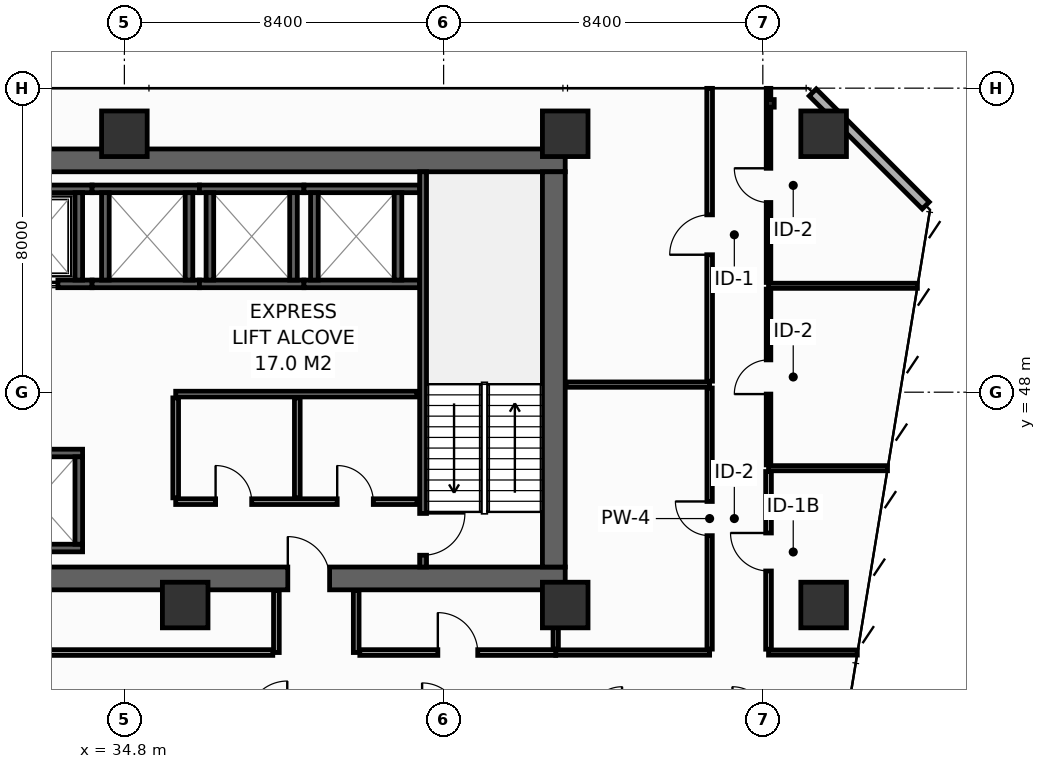
"""IFC4 building model, lengths in metres.
Left out: names, types, materials, properties, quantities, classifications, styles, units other than length and angle.
Written with IfcOpenShell. Run it as: python <this file> out.ifc"""

import sys

from ifc_helpers import new_model, si_unit, direction, frame, frame_2d, origin, origin_2d, place, context, subcontext, project, spatial, rectangle, hollow_rectangle, extrude, element, fill, save


model = new_model("IFC4")
c1 = context("Model", 3, precision=1e-05, world=origin(), true_north=direction((0.0, 1.0)))
c2 = subcontext(c1, "Body", "Model", "MODEL_VIEW")
j1 = project(units=[si_unit("LENGTHUNIT", "METRE"), si_unit("PLANEANGLEUNIT", "RADIAN")], contexts=[c1])
p1 = place(None, origin())
s1 = spatial("IfcSite", under=j1, at=p1, CompositionType="ELEMENT")
p2 = place(p1, origin())
s2 = spatial("IfcBuilding", under=s1, at=p2, CompositionType="ELEMENT")
p3 = place(p2, frame((0.0, 0.0, 64.8)))
s3 = spatial("IfcBuildingStorey", under=s2, at=p3, CompositionType="ELEMENT", Elevation=64.8)
p4 = place(p3, frame((13.5, 43.1, 0.0), z_axis=(0.0, 0.0, 1.0), x_axis=(1.0, 0.0, 0.0)))
e1 = element("IfcWall", 1, at=p4, inside=s3, PredefinedType="SHEAR", context=c2, shape_type="SweptSolid", body=[
    extrude(rectangle(XDim=32.9, YDim=0.6, at=frame_2d((16.45, 0.0))), origin(), (0.0, 0.0, 1.0), 4.15),
])
p5 = place(p4, frame((5.4, 0.0, 0.0)))
e2 = element("IfcOpeningElement", 2, at=p5, cuts=e1, PredefinedType="OPENING", context=c2, shape_type="SweptSolid", body=[
    extrude(rectangle(XDim=1.1, YDim=2.15, at=frame_2d((0.55, 1.075))), frame((0.0, 0.31, 0.0), z_axis=(0.0, -1.0, 0.0), x_axis=(1.0, 0.0, 0.0)), (0.0, 0.0, 1.0), 0.62),
])
p6 = place(p4, frame((25.6, 0.0, 0.0)))
e3 = element("IfcOpeningElement", 3, at=p6, cuts=e1, PredefinedType="OPENING", context=c2, shape_type="SweptSolid", body=[
    extrude(rectangle(XDim=1.1, YDim=2.15, at=frame_2d((0.55, 1.075))), frame((0.0, 0.31, 0.0), z_axis=(0.0, -1.0, 0.0), x_axis=(1.0, 0.0, 0.0)), (0.0, 0.0, 1.0), 0.62),
])
p7 = place(p3, frame((13.5, 54.1, 0.0), z_axis=(0.0, 0.0, 1.0), x_axis=(1.0, 0.0, 0.0)))
e4 = element("IfcWall", 4, at=p7, inside=s3, PredefinedType="SHEAR", context=c2, shape_type="SweptSolid", body=[
    extrude(rectangle(XDim=32.9, YDim=0.6, at=frame_2d((16.45, 0.0))), origin(), (0.0, 0.0, 1.0), 4.15),
])
p8 = place(p3, frame((46.1, 43.4, 0.0), z_axis=(0.0, 0.0, 1.0), x_axis=(0.0, 1.0, 0.0)))
e5 = element("IfcWall", 5, at=p8, inside=s3, PredefinedType="SHEAR", context=c2, shape_type="SweptSolid", body=[
    extrude(rectangle(XDim=10.4, YDim=0.6, at=frame_2d((5.2, 0.0))), origin(), (0.0, 0.0, 1.0), 4.15),
])
for number, where, z_axis, x_axis in (
    (6, (34.8, 54.8, 0.0), (0.0, 0.0, 1.0), (1.0, 0.0, 0.0)),
    (7, (46.4, 54.8, 0.0), (0.0, 0.0, 1.0), (1.0, 0.0, 0.0)),
    (8, (53.2, 54.8, 0.0), (0.0, 0.0, 1.0), (1.0, 0.0, 0.0)),
    (9, (36.4, 42.4, 0.0), (0.0, 0.0, 1.0), (1.0, 0.0, 0.0)),
    (10, (46.4, 42.4, 0.0), (0.0, 0.0, 1.0), (1.0, 0.0, 0.0)),
    (11, (53.2, 42.4, 0.0), (0.0, 0.0, 1.0), (1.0, 0.0, 0.0)),
):
    element("IfcColumn", number, at=place(p3, frame(where, z_axis=z_axis, x_axis=x_axis)), inside=s3, PredefinedType="COLUMN", context=c2, shape_type="SweptSolid", body=[
        extrude(hollow_rectangle(XDim=1.2, YDim=1.2, WallThickness=0.055, at=origin_2d()), origin(), (0.0, 0.0, 1.0), 4.4),
    ])
p9 = place(p3, frame((51.8, 55.6, 0.0), z_axis=(0.0, 0.0, 1.0), x_axis=(1.0, 0.0, 0.0)))
e12 = element("IfcColumn", 12, at=p9, inside=s3, PredefinedType="PILASTER", context=c2, shape_type="SweptSolid", body=[
    extrude(hollow_rectangle(XDim=0.2, YDim=0.2, WallThickness=0.01, at=origin_2d()), origin(), (0.0, 0.0, 1.0), 4.4),
])
p10 = place(p3, frame((31.125, 50.85, 0.0), z_axis=(0.0, 0.0, 1.0), x_axis=(1.0, 0.0, 0.0)))
e13 = element("IfcWall", 13, at=p10, inside=s3, PredefinedType="SHEAR", context=c2, shape_type="SweptSolid", body=[
    extrude(rectangle(XDim=2.825, YDim=0.2, at=frame_2d((1.413, 0.0))), origin(), (0.0, 0.0, 1.0), 4.15),
])
p11 = place(p10, frame((0.825, 0.0, 0.0)))
e14 = element("IfcOpeningElement", 14, at=p11, cuts=e13, PredefinedType="OPENING", context=c2, shape_type="SweptSolid", body=[
    extrude(rectangle(XDim=1.1, YDim=2.2, at=frame_2d((0.55, 1.1))), frame((0.0, 0.11, 0.0), z_axis=(0.0, -1.0, 0.0), x_axis=(1.0, 0.0, 0.0)), (0.0, 0.0, 1.0), 0.22),
])
p12 = place(p3, frame((31.125, 53.35, 0.0), z_axis=(0.0, 0.0, 1.0), x_axis=(1.0, 0.0, 0.0)))
e15 = element("IfcWall", 15, at=p12, inside=s3, PredefinedType="SHEAR", context=c2, shape_type="SweptSolid", body=[
    extrude(rectangle(XDim=2.825, YDim=0.2, at=frame_2d((1.413, 0.0))), origin(), (0.0, 0.0, 1.0), 4.15),
])
p13 = place(p3, frame((33.6, 50.95, 0.0), z_axis=(0.0, 0.0, 1.0), x_axis=(0.0, 1.0, 0.0)))
e16 = element("IfcWall", 16, at=p13, inside=s3, PredefinedType="SHEAR", context=c2, shape_type="SweptSolid", body=[
    extrude(rectangle(XDim=2.3, YDim=0.2, at=frame_2d((1.15, 0.0))), origin(), (0.0, 0.0, 1.0), 4.15),
])
for number, where, z_axis, x_axis in (
    (17, (31.125, 43.9, 0.0), (0.0, 0.0, 1.0), (1.0, 0.0, 0.0)),
    (18, (31.125, 46.4, 0.0), (0.0, 0.0, 1.0), (1.0, 0.0, 0.0)),
):
    element("IfcWall", number, at=place(p3, frame(where, z_axis=z_axis, x_axis=x_axis)), inside=s3, PredefinedType="SHEAR", context=c2, shape_type="SweptSolid", body=[
        extrude(rectangle(XDim=2.575, YDim=0.2, at=frame_2d((1.288, 0.0))), origin(), (0.0, 0.0, 1.0), 4.15),
    ])
p14 = place(p3, frame((33.6, 44.0, 0.0), z_axis=(0.0, 0.0, 1.0), x_axis=(0.0, 1.0, 0.0)))
e19 = element("IfcWall", 19, at=p14, inside=s3, PredefinedType="SHEAR", context=c2, shape_type="SweptSolid", body=[
    extrude(rectangle(XDim=2.3, YDim=0.2, at=frame_2d((1.15, 0.0))), origin(), (0.0, 0.0, 1.0), 4.15),
])
for number, where, z_axis, x_axis in (
    (20, (33.95, 50.85, 0.0), (0.0, 0.0, 1.0), (1.0, 0.0, 0.0)),
    (21, (33.95, 53.35, 0.0), (0.0, 0.0, 1.0), (1.0, 0.0, 0.0)),
):
    element("IfcWall", number, at=place(p3, frame(where, z_axis=z_axis, x_axis=x_axis)), inside=s3, PredefinedType="SHEAR", context=c2, shape_type="SweptSolid", body=[
        extrude(rectangle(XDim=2.825, YDim=0.2, at=frame_2d((1.413, 0.0))), origin(), (0.0, 0.0, 1.0), 4.15),
    ])
for number, where, z_axis, x_axis in (
    (22, (34.3, 50.95, 0.0), (0.0, 0.0, 1.0), (0.0, 1.0, 0.0)),
    (23, (36.5, 50.95, 0.0), (0.0, 0.0, 1.0), (0.0, 1.0, 0.0)),
):
    element("IfcWall", number, at=place(p3, frame(where, z_axis=z_axis, x_axis=x_axis)), inside=s3, PredefinedType="SHEAR", context=c2, shape_type="SweptSolid", body=[
        extrude(rectangle(XDim=2.3, YDim=0.2, at=frame_2d((1.15, 0.0))), origin(), (0.0, 0.0, 1.0), 4.15),
    ])
for number, where, z_axis, x_axis in (
    (24, (36.775, 50.85, 0.0), (0.0, 0.0, 1.0), (1.0, 0.0, 0.0)),
    (25, (36.775, 53.35, 0.0), (0.0, 0.0, 1.0), (1.0, 0.0, 0.0)),
):
    element("IfcWall", number, at=place(p3, frame(where, z_axis=z_axis, x_axis=x_axis)), inside=s3, PredefinedType="SHEAR", context=c2, shape_type="SweptSolid", body=[
        extrude(rectangle(XDim=2.75, YDim=0.2, at=frame_2d((1.375, 0.0))), origin(), (0.0, 0.0, 1.0), 4.15),
    ])
for number, where, z_axis, x_axis in (
    (26, (37.05, 50.95, 0.0), (0.0, 0.0, 1.0), (0.0, 1.0, 0.0)),
    (27, (39.25, 50.95, 0.0), (0.0, 0.0, 1.0), (0.0, 1.0, 0.0)),
):
    element("IfcWall", number, at=place(p3, frame(where, z_axis=z_axis, x_axis=x_axis)), inside=s3, PredefinedType="SHEAR", context=c2, shape_type="SweptSolid", body=[
        extrude(rectangle(XDim=2.3, YDim=0.2, at=frame_2d((1.15, 0.0))), origin(), (0.0, 0.0, 1.0), 4.15),
    ])
for number, where, z_axis, x_axis in (
    (28, (39.525, 50.85, 0.0), (0.0, 0.0, 1.0), (1.0, 0.0, 0.0)),
    (29, (39.525, 53.35, 0.0), (0.0, 0.0, 1.0), (1.0, 0.0, 0.0)),
):
    element("IfcWall", number, at=place(p3, frame(where, z_axis=z_axis, x_axis=x_axis)), inside=s3, PredefinedType="SHEAR", context=c2, shape_type="SweptSolid", body=[
        extrude(rectangle(XDim=3.045, YDim=0.2, at=frame_2d((1.522, 0.0))), origin(), (0.0, 0.0, 1.0), 4.15),
    ])
for number, where, z_axis, x_axis in (
    (30, (39.8, 50.95, 0.0), (0.0, 0.0, 1.0), (0.0, 1.0, 0.0)),
    (31, (42.0, 50.95, 0.0), (0.0, 0.0, 1.0), (0.0, 1.0, 0.0)),
):
    element("IfcWall", number, at=place(p3, frame(where, z_axis=z_axis, x_axis=x_axis)), inside=s3, PredefinedType="SHEAR", context=c2, shape_type="SweptSolid", body=[
        extrude(rectangle(XDim=2.3, YDim=0.2, at=frame_2d((1.15, 0.0))), origin(), (0.0, 0.0, 1.0), 4.15),
    ])
p15 = place(p3, frame((42.66, 53.8, 0.0), z_axis=(0.0, 0.0, 1.0), x_axis=(0.0, -1.0, 0.0)))
e32 = element("IfcWall", 32, at=p15, inside=s3, PredefinedType="SHEAR", context=c2, shape_type="SweptSolid", body=[
    extrude(rectangle(XDim=10.4, YDim=0.18, at=frame_2d((5.2, 0.0))), origin(), (0.0, 0.0, 1.0), 4.15),
])
p16 = place(p15, frame((8.99, 0.0, 0.0)))
e33 = element("IfcOpeningElement", 33, at=p16, cuts=e32, PredefinedType="OPENING", context=c2, shape_type="SweptSolid", body=[
    extrude(rectangle(XDim=1.1, YDim=2.15, at=frame_2d((0.55, 1.075))), frame((0.0, 0.1, 0.0), z_axis=(0.0, -1.0, 0.0), x_axis=(1.0, 0.0, 0.0)), (0.0, 0.0, 1.0), 0.2),
])
p17 = place(p3, frame((36.15, 45.12, 0.0), z_axis=(0.0, 0.0, 1.0), x_axis=(1.0, 0.0, 0.0)))
e34 = element("IfcWall", 34, at=p17, inside=s3, PredefinedType="PARTITIONING", context=c2, shape_type="SweptSolid", body=[
    extrude(rectangle(XDim=6.35, YDim=0.15, at=frame_2d((3.175, 0.0))), origin(), (0.0, 0.0, 1.0), 4.15),
])
p18 = place(p17, frame((1.05, 0.0, 0.0)))
e35 = element("IfcOpeningElement", 35, at=p18, cuts=e34, PredefinedType="OPENING", context=c2, shape_type="SweptSolid", body=[
    extrude(rectangle(XDim=0.95, YDim=2.15, at=frame_2d((0.475, 1.075))), frame((0.0, 0.085, 0.0), z_axis=(0.0, -1.0, 0.0), x_axis=(1.0, 0.0, 0.0)), (0.0, 0.0, 1.0), 0.17),
])
p19 = place(p17, frame((4.25, 0.0, 0.0)))
e36 = element("IfcOpeningElement", 36, at=p19, cuts=e34, PredefinedType="OPENING", context=c2, shape_type="SweptSolid", body=[
    extrude(rectangle(XDim=0.95, YDim=2.15, at=frame_2d((0.475, 1.075))), frame((0.0, 0.085, 0.0), z_axis=(0.0, -1.0, 0.0), x_axis=(1.0, 0.0, 0.0)), (0.0, 0.0, 1.0), 0.17),
])
p20 = place(p3, frame((36.15, 47.95, 0.0), z_axis=(0.0, 0.0, 1.0), x_axis=(1.0, 0.0, 0.0)))
e37 = element("IfcWall", 37, at=p20, inside=s3, PredefinedType="PARTITIONING", context=c2, shape_type="SweptSolid", body=[
    extrude(rectangle(XDim=6.35, YDim=0.15, at=frame_2d((3.175, 0.0))), origin(), (0.0, 0.0, 1.0), 4.15),
])
for number, where, z_axis, x_axis in (
    (38, (36.15, 45.22, 0.0), (0.0, 0.0, 1.0), (0.0, 1.0, 0.0)),
    (39, (39.35, 45.22, 0.0), (0.0, 0.0, 1.0), (0.0, 1.0, 0.0)),
):
    element("IfcWall", number, at=place(p3, frame(where, z_axis=z_axis, x_axis=x_axis)), inside=s3, PredefinedType="PARTITIONING", context=c2, shape_type="SweptSolid", body=[
        extrude(rectangle(XDim=2.63, YDim=0.15, at=frame_2d((1.315, 0.0))), origin(), (0.0, 0.0, 1.0), 4.15),
    ])
p21 = place(p3, frame((55.887, 52.913, 0.0), z_axis=(0.0, 0.0, 1.0), x_axis=(-0.707106781187, 0.707106781187, 0.0)))
e40 = element("IfcWall", 40, at=p21, inside=s3, PredefinedType="STANDARD", context=c2, shape_type="SweptSolid", body=[
    extrude(rectangle(XDim=4.206, YDim=0.26, at=frame_2d((2.103, 0.0))), origin(), (0.0, 0.0, 1.0), 4.15),
])
p22 = place(p3, frame((46.15, 41.15, 0.0), z_axis=(0.0, 0.0, 1.0), x_axis=(1.0, 0.0, 0.0)))
e41 = element("IfcWall", 41, at=p22, inside=s3, PredefinedType="PARTITIONING", context=c2, shape_type="SweptSolid", body=[
    extrude(rectangle(XDim=4.05, YDim=0.14, at=frame_2d((2.025, 0.0))), origin(), (0.0, 0.0, 1.0), 4.15),
])
p23 = place(p3, frame((46.15, 41.24, 0.0), z_axis=(0.0, 0.0, 1.0), x_axis=(0.0, 1.0, 0.0)))
e42 = element("IfcWall", 42, at=p23, inside=s3, PredefinedType="PARTITIONING", context=c2, shape_type="SweptSolid", body=[
    extrude(rectangle(XDim=1.54, YDim=0.14, at=frame_2d((0.77, 0.0))), origin(), (0.0, 0.0, 1.0), 4.15),
])
p24 = place(p3, frame((46.42, 48.2, 0.0), z_axis=(0.0, 0.0, 1.0), x_axis=(1.0, 0.0, 0.0)))
e43 = element("IfcWall", 43, at=p24, inside=s3, PredefinedType="PARTITIONING", context=c2, shape_type="SweptSolid", body=[
    extrude(rectangle(XDim=3.78, YDim=0.14, at=frame_2d((1.89, 0.0))), origin(), (0.0, 0.0, 1.0), 4.15),
])
p25 = place(p3, frame((50.2, 41.24, 0.0), z_axis=(0.0, 0.0, 1.0), x_axis=(0.0, 1.0, 0.0)))
e44 = element("IfcWall", 44, at=p25, inside=s3, PredefinedType="PARTITIONING", context=c2, shape_type="SweptSolid", body=[
    extrude(rectangle(XDim=6.87, YDim=0.14, at=frame_2d((3.435, 0.0))), origin(), (0.0, 0.0, 1.0), 3.335),
])
p26 = place(p25, frame((2.985, 0.0, 0.0)))
e45 = element("IfcOpeningElement", 45, at=p26, cuts=e44, PredefinedType="OPENING", context=c2, shape_type="SweptSolid", body=[
    extrude(rectangle(XDim=0.9, YDim=2.1, at=frame_2d((0.45, 1.05))), frame((0.0, 0.08, 0.0), z_axis=(0.0, -1.0, 0.0), x_axis=(1.0, 0.0, 0.0)), (0.0, 0.0, 1.0), 0.16),
])
p27 = place(p3, frame((50.2, 48.29, 0.0), z_axis=(0.0, 0.0, 1.0), x_axis=(0.0, 1.0, 0.0)))
e46 = element("IfcWall", 46, at=p27, inside=s3, PredefinedType="PARTITIONING", context=c2, shape_type="SweptSolid", body=[
    extrude(rectangle(XDim=7.705, YDim=0.15, at=frame_2d((3.853, 0.0))), origin(), (0.0, 0.0, 1.0), 3.435),
])
p28 = place(p27, frame((3.327, 0.0, 0.0)))
e47 = element("IfcOpeningElement", 47, at=p28, cuts=e46, PredefinedType="OPENING", context=c2, shape_type="SweptSolid", body=[
    extrude(rectangle(XDim=1.05, YDim=2.15, at=frame_2d((0.525, 1.075))), frame((0.0, 0.085, 0.0), z_axis=(0.0, -1.0, 0.0), x_axis=(1.0, 0.0, 0.0)), (0.0, 0.0, 1.0), 0.17),
])
p29 = place(p3, frame((51.75, 41.15, 0.0), z_axis=(0.0, 0.0, 1.0), x_axis=(1.0, 0.0, 0.0)))
e48 = element("IfcWall", 48, at=p29, inside=s3, PredefinedType="PARTITIONING", context=c2, shape_type="SweptSolid", body=[
    extrude(rectangle(XDim=2.336, YDim=0.135, at=frame_2d((1.168, 0.0))), origin(), (0.0, 0.0, 1.0), 3.635),
])
p30 = place(p3, frame((51.75, 46.0, 0.0), z_axis=(0.0, 0.0, 1.0), x_axis=(1.0, 0.0, 0.0)))
e49 = element("IfcWall", 49, at=p30, inside=s3, PredefinedType="PARTITIONING", context=c2, shape_type="SweptSolid", body=[
    extrude(rectangle(XDim=3.131, YDim=0.135, at=frame_2d((1.565, 0.0))), origin(), (0.0, 0.0, 1.0), 3.335),
])
p31 = place(p3, frame((51.75, 50.8, 0.0), z_axis=(0.0, 0.0, 1.0), x_axis=(1.0, 0.0, 0.0)))
e50 = element("IfcWall", 50, at=p31, inside=s3, PredefinedType="PARTITIONING", context=c2, shape_type="SweptSolid", body=[
    extrude(rectangle(XDim=3.917, YDim=0.135, at=frame_2d((1.958, 0.0))), origin(), (0.0, 0.0, 1.0), 3.335),
])
p32 = place(p3, frame((51.75, 41.238, 0.0), z_axis=(0.0, 0.0, 1.0), x_axis=(0.0, 1.0, 0.0)))
e51 = element("IfcWall", 51, at=p32, inside=s3, PredefinedType="PARTITIONING", context=c2, shape_type="SweptSolid", body=[
    extrude(rectangle(XDim=4.675, YDim=0.15, at=frame_2d((2.337, 0.0))), origin(), (0.0, 0.0, 1.0), 3.335),
])
p33 = place(p32, frame((2.058, 0.0, 0.0)))
e52 = element("IfcOpeningElement", 52, at=p33, cuts=e51, PredefinedType="OPENING", context=c2, shape_type="SweptSolid", body=[
    extrude(rectangle(XDim=1.0, YDim=2.15, at=frame_2d((0.5, 1.075))), frame((0.0, 0.085, 0.0), z_axis=(0.0, -1.0, 0.0), x_axis=(1.0, 0.0, 0.0)), (0.0, 0.0, 1.0), 0.17),
])
p34 = place(p3, frame((51.75, 46.087, 0.0), z_axis=(0.0, 0.0, 1.0), x_axis=(0.0, 1.0, 0.0)))
e53 = element("IfcWall", 53, at=p34, inside=s3, PredefinedType="PARTITIONING", context=c2, shape_type="SweptSolid", body=[
    extrude(rectangle(XDim=4.625, YDim=0.12, at=frame_2d((2.312, 0.0))), origin(), (0.0, 0.0, 1.0), 4.15),
])
p35 = place(p34, frame((1.863, 0.0, 0.0)))
e54 = element("IfcOpeningElement", 54, at=p35, cuts=e53, PredefinedType="OPENING", context=c2, shape_type="SweptSolid", body=[
    extrude(rectangle(XDim=0.9, YDim=2.1, at=frame_2d((0.45, 1.05))), frame((0.0, 0.07, 0.0), z_axis=(0.0, -1.0, 0.0), x_axis=(1.0, 0.0, 0.0)), (0.0, 0.0, 1.0), 0.14),
])
p36 = place(p3, frame((51.75, 50.887, 0.0), z_axis=(0.0, 0.0, 1.0), x_axis=(0.0, 1.0, 0.0)))
e55 = element("IfcWall", 55, at=p36, inside=s3, PredefinedType="PARTITIONING", context=c2, shape_type="SweptSolid", body=[
    extrude(rectangle(XDim=5.108, YDim=0.12, at=frame_2d((2.554, 0.0))), origin(), (0.0, 0.0, 1.0), 3.435),
])
p37 = place(p36, frame((2.104, 0.0, 0.0)))
e56 = element("IfcOpeningElement", 56, at=p37, cuts=e55, PredefinedType="OPENING", context=c2, shape_type="SweptSolid", body=[
    extrude(rectangle(XDim=0.9, YDim=2.1, at=frame_2d((0.45, 1.05))), frame((0.0, 0.07, 0.0), z_axis=(0.0, -1.0, 0.0), x_axis=(1.0, 0.0, 0.0)), (0.0, 0.0, 1.0), 0.14),
])
for number, where, z_axis, x_axis in (
    (57, (38.8, 41.15, 0.0), (0.0, 0.0, 1.0), (0.0, 1.0, 0.0)),
    (58, (40.9, 41.15, 0.0), (0.0, 0.0, 1.0), (0.0, 1.0, 0.0)),
):
    element("IfcWall", number, at=place(p3, frame(where, z_axis=z_axis, x_axis=x_axis)), inside=s3, PredefinedType="PARTITIONING", context=c2, shape_type="SweptSolid", body=[
        extrude(rectangle(XDim=1.63, YDim=0.15, at=frame_2d((0.815, 0.0))), origin(), (0.0, 0.0, 1.0), 4.15),
    ])
p38 = place(p3, frame((20.795, 41.15, 0.0), z_axis=(0.0, 0.0, 1.0), x_axis=(1.0, 0.0, 0.0)))
e59 = element("IfcWall", 59, at=p38, inside=s3, PredefinedType="PARTITIONING", context=c2, shape_type="SweptSolid", body=[
    extrude(rectangle(XDim=17.91, YDim=0.15, at=frame_2d((8.955, 0.0))), origin(), (0.0, 0.0, 1.0), 3.335),
])
p39 = place(p38, frame((8.43, 0.0, 0.0)))
e60 = element("IfcOpeningElement", 60, at=p39, cuts=e59, PredefinedType="OPENING", context=c2, shape_type="SweptSolid", body=[
    extrude(rectangle(XDim=1.05, YDim=2.15, at=frame_2d((0.525, 1.075))), frame((0.0, 0.085, 0.0), z_axis=(0.0, -1.0, 0.0), x_axis=(1.0, 0.0, 0.0)), (0.0, 0.0, 1.0), 0.17),
])
p40 = place(p3, frame((40.995, 41.15, 0.0), z_axis=(0.0, 0.0, 1.0), x_axis=(1.0, 0.0, 0.0)))
e61 = element("IfcWall", 61, at=p40, inside=s3, PredefinedType="PARTITIONING", context=c2, shape_type="SweptSolid", body=[
    extrude(rectangle(XDim=5.155, YDim=0.15, at=frame_2d((2.577, 0.0))), origin(), (0.0, 0.0, 1.0), 4.15),
])
p41 = place(p40, frame((2.053, 0.0, 0.0)))
e62 = element("IfcOpeningElement", 62, at=p41, cuts=e61, PredefinedType="OPENING", context=c2, shape_type="SweptSolid", body=[
    extrude(rectangle(XDim=1.05, YDim=2.15, at=frame_2d((0.525, 1.075))), frame((0.0, 0.085, 0.0), z_axis=(0.0, -1.0, 0.0), x_axis=(1.0, 0.0, 0.0)), (0.0, 0.0, 1.0), 0.17),
])
p42 = place(p11, origin())
e63 = element("IfcDoor", 63, at=p42, inside=s3, OperationType="SLIDING_TO_LEFT", PredefinedType="DOOR", context=c2, shape_type="SweptSolid", body=[
    extrude(rectangle(XDim=1.1, YDim=2.2, at=frame_2d((0.55, 1.1))), frame((0.0, 0.025, 0.0), z_axis=(0.0, -1.0, 0.0), x_axis=(1.0, 0.0, 0.0)), (0.0, 0.0, 1.0), 0.05),
])
fill(e14, e63)
p43 = place(p16, origin())
e64 = element("IfcDoor", 64, at=p43, inside=s3, OperationType="SINGLE_SWING_LEFT", PredefinedType="DOOR", context=c2, shape_type="SweptSolid", body=[
    extrude(rectangle(XDim=1.1, YDim=2.15, at=frame_2d((0.55, 1.075))), frame((0.0, 0.025, 0.0), z_axis=(0.0, -1.0, 0.0), x_axis=(1.0, 0.0, 0.0)), (0.0, 0.0, 1.0), 0.05),
])
fill(e33, e64)
p44 = place(p6, origin())
e65 = element("IfcDoor", 65, at=p44, inside=s3, OperationType="SINGLE_SWING_LEFT", PredefinedType="DOOR", context=c2, shape_type="SweptSolid", body=[
    extrude(rectangle(XDim=1.1, YDim=2.15, at=frame_2d((0.55, 1.075))), frame((0.0, 0.025, 0.0), z_axis=(0.0, -1.0, 0.0), x_axis=(1.0, 0.0, 0.0)), (0.0, 0.0, 1.0), 0.05),
])
fill(e3, e65)
p45 = place(p18, origin())
e66 = element("IfcDoor", 66, at=p45, inside=s3, OperationType="SINGLE_SWING_LEFT", PredefinedType="DOOR", context=c2, shape_type="SweptSolid", body=[
    extrude(rectangle(XDim=0.95, YDim=2.15, at=frame_2d((0.475, 1.075))), frame((0.0, 0.025, 0.0), z_axis=(0.0, -1.0, 0.0), x_axis=(1.0, 0.0, 0.0)), (0.0, 0.0, 1.0), 0.05),
])
fill(e35, e66)
p46 = place(p19, origin())
e67 = element("IfcDoor", 67, at=p46, inside=s3, OperationType="SINGLE_SWING_LEFT", PredefinedType="DOOR", context=c2, shape_type="SweptSolid", body=[
    extrude(rectangle(XDim=0.95, YDim=2.15, at=frame_2d((0.475, 1.075))), frame((0.0, 0.025, 0.0), z_axis=(0.0, -1.0, 0.0), x_axis=(1.0, 0.0, 0.0)), (0.0, 0.0, 1.0), 0.05),
])
fill(e36, e67)
p47 = place(p26, origin())
e68 = element("IfcDoor", 68, at=p47, inside=s3, OperationType="SINGLE_SWING_RIGHT", PredefinedType="DOOR", context=c2, shape_type="SweptSolid", body=[
    extrude(rectangle(XDim=0.9, YDim=2.1, at=frame_2d((0.45, 1.05))), frame((0.0, 0.025, 0.0), z_axis=(0.0, -1.0, 0.0), x_axis=(1.0, 0.0, 0.0)), (0.0, 0.0, 1.0), 0.05),
])
fill(e45, e68)
p48 = place(p28, origin())
e69 = element("IfcDoor", 69, at=p48, inside=s3, OperationType="SINGLE_SWING_LEFT", PredefinedType="DOOR", context=c2, shape_type="SweptSolid", body=[
    extrude(rectangle(XDim=1.05, YDim=2.15, at=frame_2d((0.525, 1.075))), frame((0.0, 0.025, 0.0), z_axis=(0.0, -1.0, 0.0), x_axis=(1.0, 0.0, 0.0)), (0.0, 0.0, 1.0), 0.05),
])
fill(e47, e69)
p49 = place(p33, origin())
e70 = element("IfcDoor", 70, at=p49, inside=s3, OperationType="SINGLE_SWING_RIGHT", PredefinedType="DOOR", context=c2, shape_type="SweptSolid", body=[
    extrude(rectangle(XDim=1.0, YDim=2.15, at=frame_2d((0.5, 1.075))), frame((0.0, 0.025, 0.0), z_axis=(0.0, -1.0, 0.0), x_axis=(1.0, 0.0, 0.0)), (0.0, 0.0, 1.0), 0.05),
])
fill(e52, e70)
p50 = place(p35, origin())
e71 = element("IfcDoor", 71, at=p50, inside=s3, OperationType="SINGLE_SWING_LEFT", PredefinedType="DOOR", context=c2, shape_type="SweptSolid", body=[
    extrude(rectangle(XDim=0.9, YDim=2.1, at=frame_2d((0.45, 1.05))), frame((0.0, 0.025, 0.0), z_axis=(0.0, -1.0, 0.0), x_axis=(1.0, 0.0, 0.0)), (0.0, 0.0, 1.0), 0.05),
])
fill(e54, e71)
p51 = place(p37, origin())
e72 = element("IfcDoor", 72, at=p51, inside=s3, OperationType="SINGLE_SWING_RIGHT", PredefinedType="DOOR", context=c2, shape_type="SweptSolid", body=[
    extrude(rectangle(XDim=0.9, YDim=2.1, at=frame_2d((0.45, 1.05))), frame((0.0, 0.025, 0.0), z_axis=(0.0, -1.0, 0.0), x_axis=(1.0, 0.0, 0.0)), (0.0, 0.0, 1.0), 0.05),
])
fill(e56, e72)
p52 = place(p41, origin())
e73 = element("IfcDoor", 73, at=p52, inside=s3, OperationType="SINGLE_SWING_LEFT", PredefinedType="DOOR", context=c2, shape_type="SweptSolid", body=[
    extrude(rectangle(XDim=1.05, YDim=2.15, at=frame_2d((0.525, 1.075))), frame((0.0, 0.025, 0.0), z_axis=(0.0, -1.0, 0.0), x_axis=(1.0, 0.0, 0.0)), (0.0, 0.0, 1.0), 0.05),
])
fill(e62, e73)
save(model, sys.argv[1])
